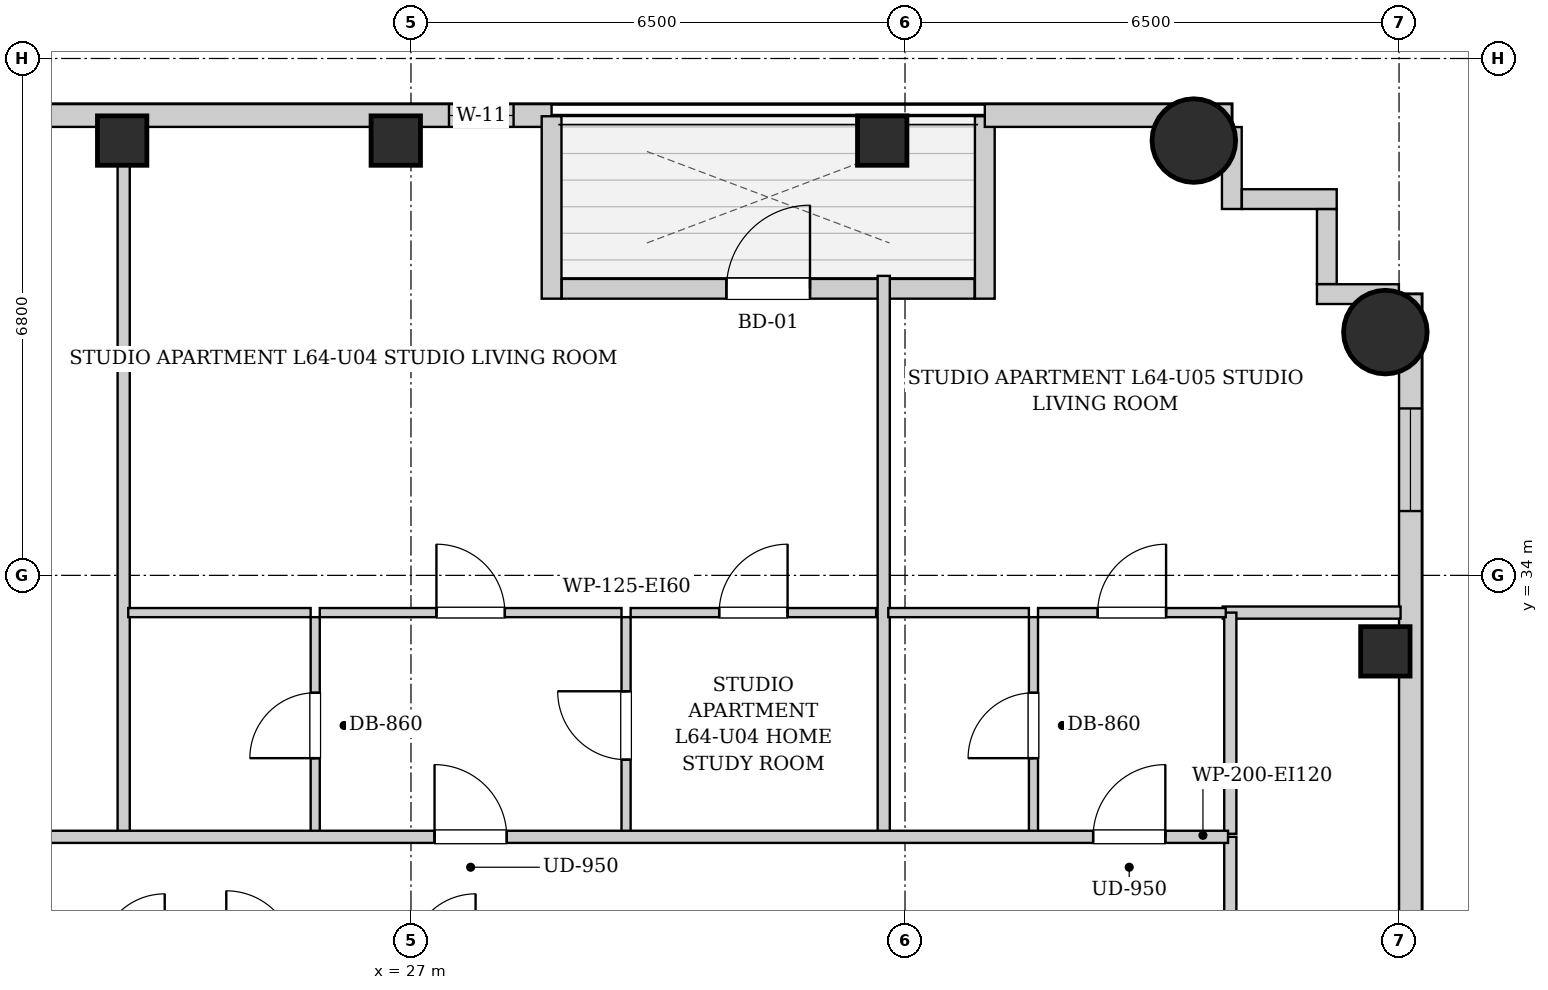
"""IFC4 building model, lengths in metres.
Left out: names, types, materials, properties, quantities, classifications, styles, units other than length and angle.
Written with IfcOpenShell. Run it as: python <this file> out.ifc"""

import sys

from ifc_helpers import new_model, si_unit, direction, frame, frame_2d, origin, origin_2d, place, context, subcontext, project, spatial, rectangle, circle, extrude, element, fill, save


model = new_model("IFC4")
c1 = context("Model", 3, precision=1e-05, world=origin(), true_north=direction((0.0, 1.0)))
c2 = subcontext(c1, "Body", "Model", "MODEL_VIEW")
j1 = project(units=[si_unit("LENGTHUNIT", "METRE"), si_unit("PLANEANGLEUNIT", "RADIAN")], contexts=[c1])
p1 = place(None, origin())
s1 = spatial("IfcSite", under=j1, at=p1, CompositionType="ELEMENT")
p2 = place(p1, origin())
s2 = spatial("IfcBuilding", under=s1, at=p2, CompositionType="ELEMENT")
p3 = place(p2, frame((0.0, 0.0, 220.7)))
s3 = spatial("IfcBuildingStorey", under=s2, at=p3, CompositionType="ELEMENT", Elevation=220.7)
for number, where, z_axis, x_axis in (
    (1, (23.2, 39.72, 0.0), (0.0, 0.0, 1.0), (1.0, 0.0, 0.0)),
    (2, (26.8, 39.72, 0.0), (0.0, 0.0, 1.0), (1.0, 0.0, 0.0)),
    (3, (33.2, 39.72, 0.0), (0.0, 0.0, 1.0), (1.0, 0.0, 0.0)),
):
    element("IfcColumn", number, at=place(p3, frame(where, z_axis=z_axis, x_axis=x_axis)), inside=s3, PredefinedType="COLUMN", context=c2, shape_type="SweptSolid", body=[
        extrude(rectangle(XDim=0.65, YDim=0.65, at=origin_2d()), origin(), (0.0, 0.0, 1.0), 3.4),
    ])
p4 = place(p3, frame((37.3, 39.72, 0.0), z_axis=(0.0, 0.0, 1.0), x_axis=(1.0, 0.0, 0.0)))
e4 = element("IfcColumn", 4, at=p4, inside=s3, PredefinedType="COLUMN", context=c2, shape_type="SweptSolid", body=[
    extrude(circle(Radius=0.55, at=origin_2d()), origin(), (0.0, 0.0, 1.0), 3.4),
])
p5 = place(p3, frame((39.82, 33.0, 0.0), z_axis=(0.0, 0.0, 1.0), x_axis=(1.0, 0.0, 0.0)))
e5 = element("IfcColumn", 5, at=p5, inside=s3, PredefinedType="COLUMN", context=c2, shape_type="SweptSolid", body=[
    extrude(rectangle(XDim=0.65, YDim=0.65, at=origin_2d()), origin(), (0.0, 0.0, 1.0), 3.4),
])
p6 = place(p3, frame((39.82, 37.2, 0.0), z_axis=(0.0, 0.0, 1.0), x_axis=(1.0, 0.0, 0.0)))
e6 = element("IfcColumn", 6, at=p6, inside=s3, PredefinedType="COLUMN", context=c2, shape_type="SweptSolid", body=[
    extrude(circle(Radius=0.55, at=origin_2d()), origin(), (0.0, 0.0, 1.0), 3.4),
])
p7 = place(p3, frame((19.7, 40.05, 0.0), z_axis=(0.0, 0.0, 1.0), x_axis=(1.0, 0.0, 0.0)))
e7 = element("IfcWall", 7, at=p7, inside=s3, PredefinedType="SOLIDWALL", context=c2, shape_type="SweptSolid", body=[
    extrude(rectangle(XDim=9.15, YDim=0.3, at=frame_2d((4.575, 0.0))), origin(), (0.0, 0.0, 1.0), 3.14),
])
p8 = place(p7, frame((7.8, 0.0, 0.55)))
e8 = element("IfcOpeningElement", 8, at=p8, cuts=e7, PredefinedType="OPENING", context=c2, shape_type="SweptSolid", body=[
    extrude(rectangle(XDim=0.85, YDim=1.2, at=frame_2d((0.425, 0.6))), frame((0.0, 0.16, 0.0), z_axis=(0.0, -1.0, 0.0), x_axis=(1.0, 0.0, 0.0)), (0.0, 0.0, 1.0), 0.32),
])
p9 = place(p3, frame((28.85, 40.04, 0.0), z_axis=(0.0, 0.0, 1.0), x_axis=(0.0, -1.0, 0.0)))
e9 = element("IfcWall", 9, at=p9, inside=s3, PredefinedType="SOLIDWALL", context=c2, shape_type="SweptSolid", body=[
    extrude(rectangle(XDim=2.4, YDim=0.26, at=frame_2d((1.2, 0.0))), origin(), (0.0, 0.0, 1.0), 3.14),
])
p10 = place(p3, frame((28.984, 37.77, 0.0), z_axis=(0.0, 0.0, 1.0), x_axis=(1.0, 0.0, 0.0)))
e10 = element("IfcWall", 10, at=p10, inside=s3, PredefinedType="SOLIDWALL", context=c2, shape_type="SweptSolid", body=[
    extrude(rectangle(XDim=5.432, YDim=0.26, at=frame_2d((2.716, 0.0))), origin(), (0.0, 0.0, 1.0), 3.14),
])
p11 = place(p10, frame((2.166, 0.0, 0.0)))
e11 = element("IfcOpeningElement", 11, at=p11, cuts=e10, PredefinedType="OPENING", context=c2, shape_type="SweptSolid", body=[
    extrude(rectangle(XDim=1.1, YDim=2.0, at=frame_2d((0.55, 1.0))), frame((0.0, 0.14, 0.0), z_axis=(0.0, -1.0, 0.0), x_axis=(1.0, 0.0, 0.0)), (0.0, 0.0, 1.0), 0.28),
])
p12 = place(p3, frame((34.55, 37.64, 0.0), z_axis=(0.0, 0.0, 1.0), x_axis=(0.0, 1.0, 0.0)))
e12 = element("IfcWall", 12, at=p12, inside=s3, PredefinedType="SOLIDWALL", context=c2, shape_type="SweptSolid", body=[
    extrude(rectangle(XDim=2.4, YDim=0.26, at=frame_2d((1.2, 0.0))), origin(), (0.0, 0.0, 1.0), 3.14),
])
p13 = place(p3, frame((34.55, 40.05, 0.0), z_axis=(0.0, 0.0, 1.0), x_axis=(1.0, 0.0, 0.0)))
e13 = element("IfcWall", 13, at=p13, inside=s3, PredefinedType="SOLIDWALL", context=c2, shape_type="SweptSolid", body=[
    extrude(rectangle(XDim=3.25, YDim=0.3, at=frame_2d((1.625, 0.0))), origin(), (0.0, 0.0, 1.0), 3.14),
])
p14 = place(p3, frame((40.15, 37.7, 0.0), z_axis=(0.0, 0.0, 1.0), x_axis=(0.0, -1.0, 0.0)))
e14 = element("IfcWall", 14, at=p14, inside=s3, PredefinedType="SOLIDWALL", context=c2, shape_type="SweptSolid", body=[
    extrude(rectangle(XDim=31.4, YDim=0.3, at=frame_2d((15.7, 0.0))), origin(), (0.0, 0.0, 1.0), 3.14),
])
p15 = place(p14, frame((28.546, 0.0, 0.55)))
e15 = element("IfcOpeningElement", 15, at=p15, cuts=e14, PredefinedType="OPENING", context=c2, shape_type="SweptSolid", body=[
    extrude(rectangle(XDim=1.35, YDim=1.2, at=frame_2d((0.675, 0.6))), frame((0.0, 0.16, 0.0), z_axis=(0.0, -1.0, 0.0), x_axis=(1.0, 0.0, 0.0)), (0.0, 0.0, 1.0), 0.32),
])
p16 = place(p14, frame((1.504, 0.0, 0.55)))
e16 = element("IfcOpeningElement", 16, at=p16, cuts=e14, PredefinedType="OPENING", context=c2, shape_type="SweptSolid", body=[
    extrude(rectangle(XDim=1.35, YDim=1.2, at=frame_2d((0.675, 0.6))), frame((0.0, 0.16, 0.0), z_axis=(0.0, -1.0, 0.0), x_axis=(1.0, 0.0, 0.0)), (0.0, 0.0, 1.0), 0.32),
])
p17 = place(p14, frame((18.2, 0.0, 0.55)))
e17 = element("IfcOpeningElement", 17, at=p17, cuts=e14, PredefinedType="OPENING", context=c2, shape_type="SweptSolid", body=[
    extrude(rectangle(XDim=1.35, YDim=1.2, at=frame_2d((0.675, 0.6))), frame((0.0, 0.16, 0.0), z_axis=(0.0, -1.0, 0.0), x_axis=(1.0, 0.0, 0.0)), (0.0, 0.0, 1.0), 0.32),
])
p18 = place(p14, frame((19.81, 0.0, 0.55)))
e18 = element("IfcOpeningElement", 18, at=p18, cuts=e14, PredefinedType="OPENING", context=c2, shape_type="SweptSolid", body=[
    extrude(rectangle(XDim=1.35, YDim=1.2, at=frame_2d((0.675, 0.6))), frame((0.0, 0.16, 0.0), z_axis=(0.0, -1.0, 0.0), x_axis=(1.0, 0.0, 0.0)), (0.0, 0.0, 1.0), 0.32),
])
p19 = place(p14, frame((11.043, 0.0, 0.55)))
e19 = element("IfcOpeningElement", 19, at=p19, cuts=e14, PredefinedType="OPENING", context=c2, shape_type="SweptSolid", body=[
    extrude(rectangle(XDim=1.35, YDim=1.2, at=frame_2d((0.675, 0.6))), frame((0.0, 0.16, 0.0), z_axis=(0.0, -1.0, 0.0), x_axis=(1.0, 0.0, 0.0)), (0.0, 0.0, 1.0), 0.32),
])
p20 = place(p14, frame((9.185, 0.0, 0.55)))
e20 = element("IfcOpeningElement", 20, at=p20, cuts=e14, PredefinedType="OPENING", context=c2, shape_type="SweptSolid", body=[
    extrude(rectangle(XDim=1.35, YDim=1.2, at=frame_2d((0.675, 0.6))), frame((0.0, 0.16, 0.0), z_axis=(0.0, -1.0, 0.0), x_axis=(1.0, 0.0, 0.0)), (0.0, 0.0, 1.0), 0.32),
])
p21 = place(p3, frame((37.8, 39.898, 0.0), z_axis=(0.0, 0.0, 1.0), x_axis=(0.0, -1.0, 0.0)))
e21 = element("IfcWall", 21, at=p21, inside=s3, PredefinedType="SOLIDWALL", context=c2, shape_type="SweptSolid", body=[
    extrude(rectangle(XDim=1.078, YDim=0.26, at=frame_2d((0.539, 0.0))), origin(), (0.0, 0.0, 1.0), 3.14),
])
p22 = place(p3, frame((37.932, 38.95, 0.0), z_axis=(0.0, 0.0, 1.0), x_axis=(1.0, 0.0, 0.0)))
e22 = element("IfcWall", 22, at=p22, inside=s3, PredefinedType="SOLIDWALL", context=c2, shape_type="SweptSolid", body=[
    extrude(rectangle(XDim=1.248, YDim=0.26, at=frame_2d((0.624, 0.0))), origin(), (0.0, 0.0, 1.0), 3.14),
])
p23 = place(p3, frame((39.05, 38.818, 0.0), z_axis=(0.0, 0.0, 1.0), x_axis=(0.0, -1.0, 0.0)))
e23 = element("IfcWall", 23, at=p23, inside=s3, PredefinedType="SOLIDWALL", context=c2, shape_type="SweptSolid", body=[
    extrude(rectangle(XDim=0.986, YDim=0.26, at=frame_2d((0.493, 0.0))), origin(), (0.0, 0.0, 1.0), 3.14),
])
p24 = place(p3, frame((38.92, 37.7, 0.0), z_axis=(0.0, 0.0, 1.0), x_axis=(1.0, 0.0, 0.0)))
e24 = element("IfcWall", 24, at=p24, inside=s3, PredefinedType="SOLIDWALL", context=c2, shape_type="SweptSolid", body=[
    extrude(rectangle(XDim=1.078, YDim=0.26, at=frame_2d((0.539, 0.0))), origin(), (0.0, 0.0, 1.0), 3.14),
])
p25 = place(p3, frame((37.78, 28.98, 0.0), z_axis=(0.0, 0.0, 1.0), x_axis=(0.0, 1.0, 0.0)))
e25 = element("IfcWall", 25, at=p25, inside=s3, PredefinedType="PARTITIONING", context=c2, shape_type="SweptSolid", body=[
    extrude(rectangle(XDim=1.58, YDim=0.16, at=frame_2d((0.79, 0.0))), origin(), (0.0, 0.0, 1.0), 3.14),
])
p26 = place(p3, frame((23.22, 30.6, 0.0), z_axis=(0.0, 0.0, 1.0), x_axis=(0.0, 1.0, 0.0)))
e26 = element("IfcWall", 26, at=p26, inside=s3, PredefinedType="PARTITIONING", context=c2, shape_type="SweptSolid", body=[
    extrude(rectangle(XDim=9.32, YDim=0.16, at=frame_2d((4.66, 0.0))), origin(), (0.0, 0.0, 1.0), 3.14),
])
p27 = place(p3, frame((25.74, 30.6, 0.0), z_axis=(0.0, 0.0, 1.0), x_axis=(0.0, 1.0, 0.0)))
e27 = element("IfcWall", 27, at=p27, inside=s3, PredefinedType="PARTITIONING", context=c2, shape_type="SweptSolid", body=[
    extrude(rectangle(XDim=2.85, YDim=0.12, at=frame_2d((1.425, 0.0))), origin(), (0.0, 0.0, 1.0), 3.14),
])
p28 = place(p27, frame((0.995, 0.0, 0.0)))
e28 = element("IfcOpeningElement", 28, at=p28, cuts=e27, PredefinedType="OPENING", context=c2, shape_type="SweptSolid", body=[
    extrude(rectangle(XDim=0.86, YDim=2.05, at=frame_2d((0.43, 1.025))), frame((0.0, 0.07, 0.0), z_axis=(0.0, -1.0, 0.0), x_axis=(1.0, 0.0, 0.0)), (0.0, 0.0, 1.0), 0.14),
])
p29 = place(p3, frame((23.28, 33.51, 0.0), z_axis=(0.0, 0.0, 1.0), x_axis=(1.0, 0.0, 0.0)))
e29 = element("IfcWall", 29, at=p29, inside=s3, PredefinedType="PARTITIONING", context=c2, shape_type="SweptSolid", body=[
    extrude(rectangle(XDim=2.4, YDim=0.12, at=frame_2d((1.2, 0.0))), origin(), (0.0, 0.0, 1.0), 3.14),
])
p30 = place(p3, frame((29.83, 30.6, 0.0), z_axis=(0.0, 0.0, 1.0), x_axis=(0.0, 1.0, 0.0)))
e30 = element("IfcWall", 30, at=p30, inside=s3, PredefinedType="PARTITIONING", context=c2, shape_type="SweptSolid", body=[
    extrude(rectangle(XDim=2.85, YDim=0.12, at=frame_2d((1.425, 0.0))), origin(), (0.0, 0.0, 1.0), 3.14),
])
p31 = place(p30, frame((0.975, 0.0, 0.0)))
e31 = element("IfcOpeningElement", 31, at=p31, cuts=e30, PredefinedType="OPENING", context=c2, shape_type="SweptSolid", body=[
    extrude(rectangle(XDim=0.9, YDim=2.05, at=frame_2d((0.45, 1.025))), frame((0.0, 0.07, 0.0), z_axis=(0.0, -1.0, 0.0), x_axis=(1.0, 0.0, 0.0)), (0.0, 0.0, 1.0), 0.14),
])
p32 = place(p3, frame((25.8, 33.51, 0.0), z_axis=(0.0, 0.0, 1.0), x_axis=(1.0, 0.0, 0.0)))
e32 = element("IfcWall", 32, at=p32, inside=s3, PredefinedType="PARTITIONING", context=c2, shape_type="SweptSolid", body=[
    extrude(rectangle(XDim=3.97, YDim=0.12, at=frame_2d((1.985, 0.0))), origin(), (0.0, 0.0, 1.0), 3.14),
])
p33 = place(p32, frame((1.535, 0.0, 0.0)))
e33 = element("IfcOpeningElement", 33, at=p33, cuts=e32, PredefinedType="OPENING", context=c2, shape_type="SweptSolid", body=[
    extrude(rectangle(XDim=0.9, YDim=2.05, at=frame_2d((0.45, 1.025))), frame((0.0, 0.07, 0.0), z_axis=(0.0, -1.0, 0.0), x_axis=(1.0, 0.0, 0.0)), (0.0, 0.0, 1.0), 0.14),
])
p34 = place(p3, frame((29.89, 33.51, 0.0), z_axis=(0.0, 0.0, 1.0), x_axis=(1.0, 0.0, 0.0)))
e34 = element("IfcWall", 34, at=p34, inside=s3, PredefinedType="PARTITIONING", context=c2, shape_type="SweptSolid", body=[
    extrude(rectangle(XDim=3.23, YDim=0.12, at=frame_2d((1.615, 0.0))), origin(), (0.0, 0.0, 1.0), 3.14),
])
p35 = place(p34, frame((1.165, 0.0, 0.0)))
e35 = element("IfcOpeningElement", 35, at=p35, cuts=e34, PredefinedType="OPENING", context=c2, shape_type="SweptSolid", body=[
    extrude(rectangle(XDim=0.9, YDim=2.05, at=frame_2d((0.45, 1.025))), frame((0.0, 0.07, 0.0), z_axis=(0.0, -1.0, 0.0), x_axis=(1.0, 0.0, 0.0)), (0.0, 0.0, 1.0), 0.14),
])
p36 = place(p3, frame((37.68, 33.51, 0.0), z_axis=(0.0, 0.0, 1.0), x_axis=(1.0, 0.0, 0.0)))
e36 = element("IfcWall", 36, at=p36, inside=s3, PredefinedType="PARTITIONING", context=c2, shape_type="SweptSolid", body=[
    extrude(rectangle(XDim=2.34, YDim=0.16, at=frame_2d((1.17, 0.0))), origin(), (0.0, 0.0, 1.0), 3.14),
])
p37 = place(p3, frame((37.78, 30.6, 0.0), z_axis=(0.0, 0.0, 1.0), x_axis=(0.0, 1.0, 0.0)))
e37 = element("IfcWall", 37, at=p37, inside=s3, PredefinedType="PARTITIONING", context=c2, shape_type="SweptSolid", body=[
    extrude(rectangle(XDim=2.91, YDim=0.16, at=frame_2d((1.455, 0.0))), origin(), (0.0, 0.0, 1.0), 3.14),
])
p38 = place(p3, frame((33.22, 30.6, 0.0), z_axis=(0.0, 0.0, 1.0), x_axis=(0.0, 1.0, 0.0)))
e38 = element("IfcWall", 38, at=p38, inside=s3, PredefinedType="PARTITIONING", context=c2, shape_type="SweptSolid", body=[
    extrude(rectangle(XDim=7.34, YDim=0.16, at=frame_2d((3.67, 0.0))), origin(), (0.0, 0.0, 1.0), 2.668),
])
p39 = place(p3, frame((35.19, 30.6, 0.0), z_axis=(0.0, 0.0, 1.0), x_axis=(0.0, 1.0, 0.0)))
e39 = element("IfcWall", 39, at=p39, inside=s3, PredefinedType="PARTITIONING", context=c2, shape_type="SweptSolid", body=[
    extrude(rectangle(XDim=2.85, YDim=0.12, at=frame_2d((1.425, 0.0))), origin(), (0.0, 0.0, 1.0), 3.14),
])
p40 = place(p39, frame((0.995, 0.0, 0.0)))
e40 = element("IfcOpeningElement", 40, at=p40, cuts=e39, PredefinedType="OPENING", context=c2, shape_type="SweptSolid", body=[
    extrude(rectangle(XDim=0.86, YDim=2.05, at=frame_2d((0.43, 1.025))), frame((0.0, 0.07, 0.0), z_axis=(0.0, -1.0, 0.0), x_axis=(1.0, 0.0, 0.0)), (0.0, 0.0, 1.0), 0.14),
])
p41 = place(p3, frame((33.28, 33.51, 0.0), z_axis=(0.0, 0.0, 1.0), x_axis=(1.0, 0.0, 0.0)))
e41 = element("IfcWall", 41, at=p41, inside=s3, PredefinedType="PARTITIONING", context=c2, shape_type="SweptSolid", body=[
    extrude(rectangle(XDim=1.85, YDim=0.12, at=frame_2d((0.925, 0.0))), origin(), (0.0, 0.0, 1.0), 3.14),
])
p42 = place(p3, frame((35.25, 33.51, 0.0), z_axis=(0.0, 0.0, 1.0), x_axis=(1.0, 0.0, 0.0)))
e42 = element("IfcWall", 42, at=p42, inside=s3, PredefinedType="PARTITIONING", context=c2, shape_type="SweptSolid", body=[
    extrude(rectangle(XDim=2.47, YDim=0.12, at=frame_2d((1.235, 0.0))), origin(), (0.0, 0.0, 1.0), 3.14),
])
p43 = place(p42, frame((0.785, 0.0, 0.0)))
e43 = element("IfcOpeningElement", 43, at=p43, cuts=e42, PredefinedType="OPENING", context=c2, shape_type="SweptSolid", body=[
    extrude(rectangle(XDim=0.9, YDim=2.05, at=frame_2d((0.45, 1.025))), frame((0.0, 0.07, 0.0), z_axis=(0.0, -1.0, 0.0), x_axis=(1.0, 0.0, 0.0)), (0.0, 0.0, 1.0), 0.14),
])
p44 = place(p3, frame((13.15, 30.56, 0.0), z_axis=(0.0, 0.0, 1.0), x_axis=(1.0, 0.0, 0.0)))
e44 = element("IfcWall", 44, at=p44, inside=s3, PredefinedType="PARTITIONING", context=c2, shape_type="SweptSolid", body=[
    extrude(rectangle(XDim=24.6, YDim=0.16, at=frame_2d((12.3, 0.0))), origin(), (0.0, 0.0, 1.0), 3.14),
])
p45 = place(p44, frame((5.185, 0.0, 0.0)))
e45 = element("IfcOpeningElement", 45, at=p45, cuts=e44, PredefinedType="OPENING", context=c2, shape_type="SweptSolid", body=[
    extrude(rectangle(XDim=0.95, YDim=2.1, at=frame_2d((0.475, 1.05))), frame((0.0, 0.09, 0.0), z_axis=(0.0, -1.0, 0.0), x_axis=(1.0, 0.0, 0.0)), (0.0, 0.0, 1.0), 0.18),
])
p46 = place(p44, frame((14.16, 0.0, 0.0)))
e46 = element("IfcOpeningElement", 46, at=p46, cuts=e44, PredefinedType="OPENING", context=c2, shape_type="SweptSolid", body=[
    extrude(rectangle(XDim=0.95, YDim=2.1, at=frame_2d((0.475, 1.05))), frame((0.0, 0.09, 0.0), z_axis=(0.0, -1.0, 0.0), x_axis=(1.0, 0.0, 0.0)), (0.0, 0.0, 1.0), 0.18),
])
p47 = place(p44, frame((22.825, 0.0, 0.0)))
e47 = element("IfcOpeningElement", 47, at=p47, cuts=e44, PredefinedType="OPENING", context=c2, shape_type="SweptSolid", body=[
    extrude(rectangle(XDim=0.95, YDim=2.1, at=frame_2d((0.475, 1.05))), frame((0.0, 0.09, 0.0), z_axis=(0.0, -1.0, 0.0), x_axis=(1.0, 0.0, 0.0)), (0.0, 0.0, 1.0), 0.18),
])
p48 = place(p28, origin())
e48 = element("IfcDoor", 48, at=p48, inside=s3, OperationType="SINGLE_SWING_LEFT", PredefinedType="DOOR", context=c2, shape_type="SweptSolid", body=[
    extrude(rectangle(XDim=0.86, YDim=2.05, at=frame_2d((0.43, 1.025))), frame((0.0, 0.025, 0.0), z_axis=(0.0, -1.0, 0.0), x_axis=(1.0, 0.0, 0.0)), (0.0, 0.0, 1.0), 0.05),
])
fill(e28, e48)
p49 = place(p31, origin())
e49 = element("IfcDoor", 49, at=p49, inside=s3, OperationType="SINGLE_SWING_RIGHT", PredefinedType="DOOR", context=c2, shape_type="SweptSolid", body=[
    extrude(rectangle(XDim=0.9, YDim=2.05, at=frame_2d((0.45, 1.025))), frame((0.0, 0.025, 0.0), z_axis=(0.0, -1.0, 0.0), x_axis=(1.0, 0.0, 0.0)), (0.0, 0.0, 1.0), 0.05),
])
fill(e31, e49)
p50 = place(p33, origin())
e50 = element("IfcDoor", 50, at=p50, inside=s3, OperationType="SINGLE_SWING_LEFT", PredefinedType="DOOR", context=c2, shape_type="SweptSolid", body=[
    extrude(rectangle(XDim=0.9, YDim=2.05, at=frame_2d((0.45, 1.025))), frame((0.0, 0.025, 0.0), z_axis=(0.0, -1.0, 0.0), x_axis=(1.0, 0.0, 0.0)), (0.0, 0.0, 1.0), 0.05),
])
fill(e33, e50)
p51 = place(p35, origin())
e51 = element("IfcDoor", 51, at=p51, inside=s3, OperationType="SINGLE_SWING_RIGHT", PredefinedType="DOOR", context=c2, shape_type="SweptSolid", body=[
    extrude(rectangle(XDim=0.9, YDim=2.05, at=frame_2d((0.45, 1.025))), frame((0.0, 0.025, 0.0), z_axis=(0.0, -1.0, 0.0), x_axis=(1.0, 0.0, 0.0)), (0.0, 0.0, 1.0), 0.05),
])
fill(e35, e51)
p52 = place(p40, origin())
e52 = element("IfcDoor", 52, at=p52, inside=s3, OperationType="SINGLE_SWING_LEFT", PredefinedType="DOOR", context=c2, shape_type="SweptSolid", body=[
    extrude(rectangle(XDim=0.86, YDim=2.05, at=frame_2d((0.43, 1.025))), frame((0.0, 0.025, 0.0), z_axis=(0.0, -1.0, 0.0), x_axis=(1.0, 0.0, 0.0)), (0.0, 0.0, 1.0), 0.05),
])
fill(e40, e52)
p53 = place(p43, origin())
e53 = element("IfcDoor", 53, at=p53, inside=s3, OperationType="SINGLE_SWING_RIGHT", PredefinedType="DOOR", context=c2, shape_type="SweptSolid", body=[
    extrude(rectangle(XDim=0.9, YDim=2.05, at=frame_2d((0.45, 1.025))), frame((0.0, 0.025, 0.0), z_axis=(0.0, -1.0, 0.0), x_axis=(1.0, 0.0, 0.0)), (0.0, 0.0, 1.0), 0.05),
])
fill(e43, e53)
p54 = place(p46, origin())
e54 = element("IfcDoor", 54, at=p54, inside=s3, OperationType="SINGLE_SWING_LEFT", PredefinedType="DOOR", context=c2, shape_type="SweptSolid", body=[
    extrude(rectangle(XDim=0.95, YDim=2.1, at=frame_2d((0.475, 1.05))), frame((0.0, 0.025, 0.0), z_axis=(0.0, -1.0, 0.0), x_axis=(1.0, 0.0, 0.0)), (0.0, 0.0, 1.0), 0.05),
])
fill(e46, e54)
p55 = place(p47, origin())
e55 = element("IfcDoor", 55, at=p55, inside=s3, OperationType="SINGLE_SWING_RIGHT", PredefinedType="DOOR", context=c2, shape_type="SweptSolid", body=[
    extrude(rectangle(XDim=0.95, YDim=2.1, at=frame_2d((0.475, 1.05))), frame((0.0, 0.025, 0.0), z_axis=(0.0, -1.0, 0.0), x_axis=(1.0, 0.0, 0.0)), (0.0, 0.0, 1.0), 0.05),
])
fill(e47, e55)
p56 = place(p11, origin())
e56 = element("IfcDoor", 56, at=p56, inside=s3, OperationType="SINGLE_SWING_RIGHT", PredefinedType="DOOR", context=c2, shape_type="SweptSolid", body=[
    extrude(rectangle(XDim=1.1, YDim=2.0, at=frame_2d((0.55, 1.0))), frame((0.0, 0.025, 0.0), z_axis=(0.0, -1.0, 0.0), x_axis=(1.0, 0.0, 0.0)), (0.0, 0.0, 1.0), 0.05),
])
fill(e11, e56)
p57 = place(p8, origin())
e57 = element("IfcWindow", 57, at=p57, inside=s3, PartitioningType="SINGLE_PANEL", PredefinedType="WINDOW", context=c2, shape_type="SweptSolid", body=[
    extrude(rectangle(XDim=0.85, YDim=1.2, at=frame_2d((0.425, 0.6))), frame((0.0, 0.03, 0.0), z_axis=(0.0, -1.0, 0.0), x_axis=(1.0, 0.0, 0.0)), (0.0, 0.0, 1.0), 0.06),
])
fill(e8, e57)
p58 = place(p16, origin())
e58 = element("IfcWindow", 58, at=p58, inside=s3, PartitioningType="SINGLE_PANEL", PredefinedType="WINDOW", context=c2, shape_type="SweptSolid", body=[
    extrude(rectangle(XDim=1.35, YDim=1.2, at=frame_2d((0.675, 0.6))), frame((0.0, 0.03, 0.0), z_axis=(0.0, -1.0, 0.0), x_axis=(1.0, 0.0, 0.0)), (0.0, 0.0, 1.0), 0.06),
])
fill(e16, e58)
save(model, sys.argv[1])
